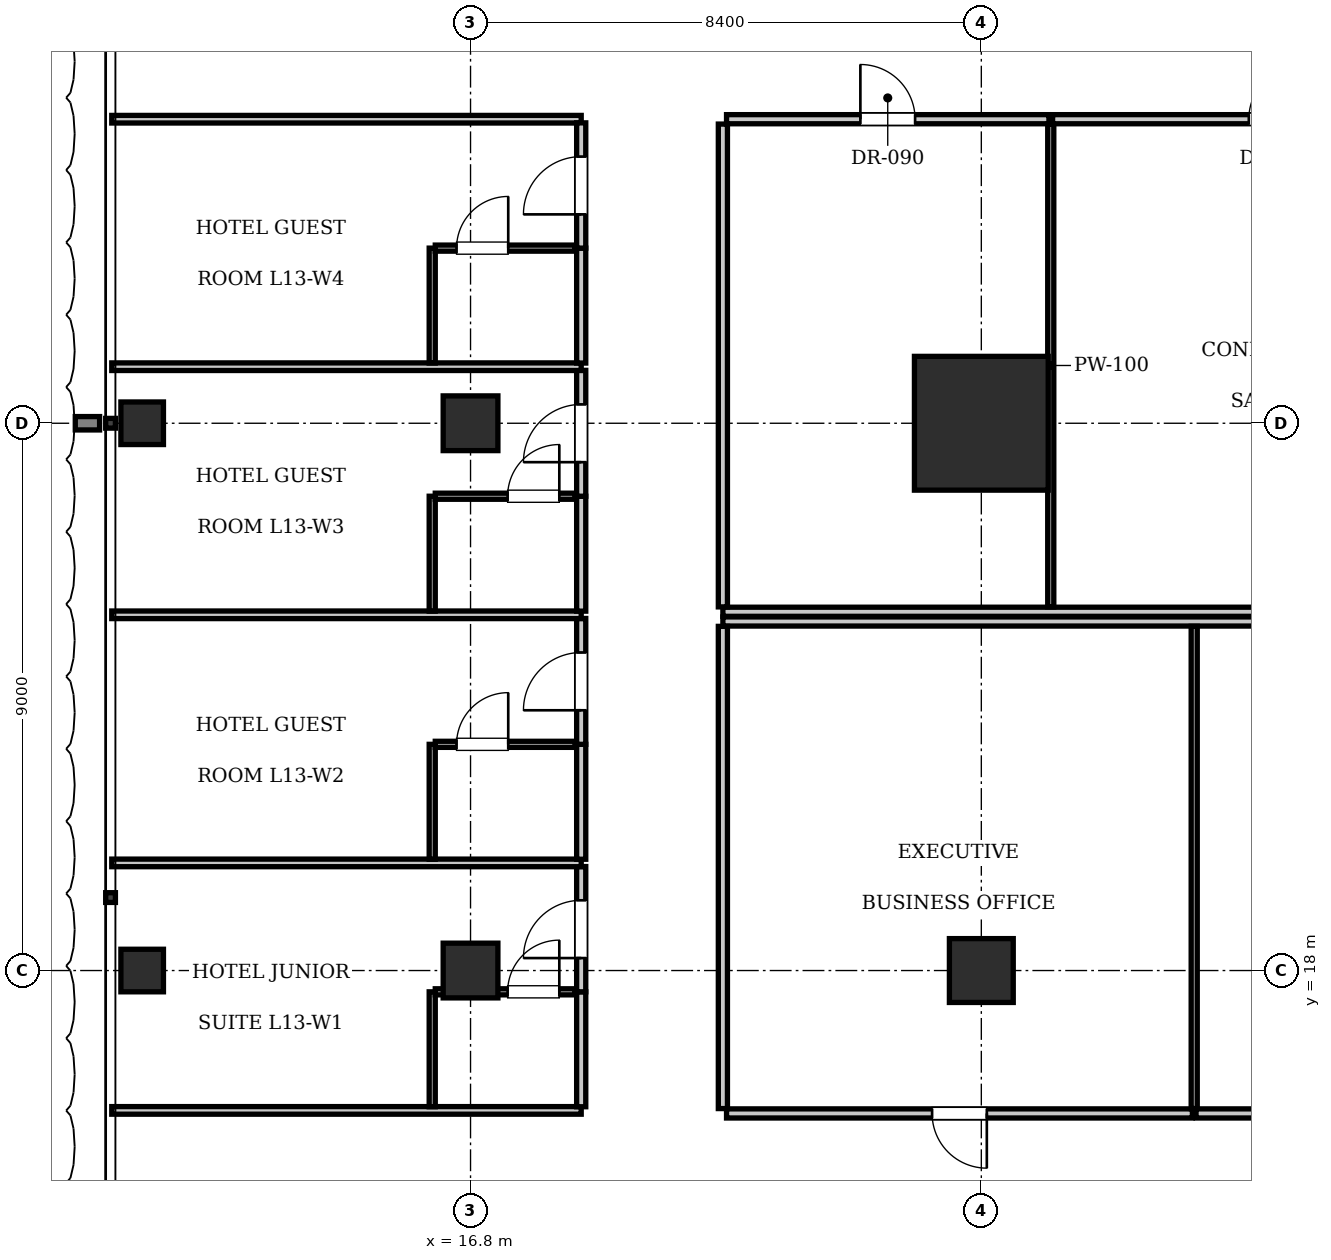
"""IFC4 building model, lengths in metres.
Left out: names, types, materials, properties, quantities, classifications, styles, units other than length and angle.
Written with IfcOpenShell. Run it as: python <this file> out.ifc"""

import sys

from ifc_helpers import new_model, si_unit, direction, frame, frame_2d, origin, origin_2d, place, context, subcontext, project, spatial, rectangle, i_section, extrude, element, fill, save


model = new_model("IFC4")
c1 = context("Model", 3, precision=1e-05, world=origin(), true_north=direction((0.0, 1.0)))
c2 = subcontext(c1, "Body", "Model", "MODEL_VIEW")
j1 = project(units=[si_unit("LENGTHUNIT", "METRE"), si_unit("PLANEANGLEUNIT", "RADIAN")], contexts=[c1])
p1 = place(None, origin())
s1 = spatial("IfcSite", under=j1, at=p1, CompositionType="ELEMENT")
p2 = place(p1, origin())
s2 = spatial("IfcBuilding", under=s1, at=p2, CompositionType="ELEMENT")
p3 = place(p2, frame((0.0, 0.0, 57.75)))
s3 = spatial("IfcBuildingStorey", under=s2, at=p3, CompositionType="ELEMENT", Elevation=57.75)
p4 = place(p3, frame((25.2, 27.0, 0.0), z_axis=(0.0, 0.0, 1.0), x_axis=(1.0, 0.0, 0.0)))
e1 = element("IfcColumn", 1, at=p4, inside=s3, PredefinedType="COLUMN", context=c2, shape_type="SweptSolid", body=[
    extrude(rectangle(XDim=2.2, YDim=2.2, at=origin_2d()), origin(), (0.0, 0.0, 1.0), 3.85),
])
p5 = place(p3, frame((25.2, 18.0, 0.0), z_axis=(0.0, 0.0, 1.0), x_axis=(1.0, 0.0, 0.0)))
e2 = element("IfcColumn", 2, at=p5, inside=s3, PredefinedType="COLUMN", context=c2, shape_type="SweptSolid", body=[
    extrude(rectangle(XDim=1.05, YDim=1.05, at=origin_2d()), origin(), (0.0, 0.0, 1.0), 3.85),
])
for number, where, z_axis, x_axis in (
    (3, (16.8, 18.0, 0.0), (0.0, 0.0, 1.0), (1.0, 0.0, 0.0)),
    (4, (16.8, 27.0, 0.0), (0.0, 0.0, 1.0), (1.0, 0.0, 0.0)),
):
    element("IfcColumn", number, at=place(p3, frame(where, z_axis=z_axis, x_axis=x_axis)), inside=s3, PredefinedType="COLUMN", context=c2, shape_type="SweptSolid", body=[
        extrude(rectangle(XDim=0.9, YDim=0.9, at=origin_2d()), origin(), (0.0, 0.0, 1.0), 3.85),
    ])
for number, where, z_axis, x_axis in (
    (5, (11.4, 18.0, 0.0), (0.0, 0.0, 1.0), (1.0, 0.0, 0.0)),
    (6, (11.4, 27.0, 0.0), (0.0, 0.0, 1.0), (1.0, 0.0, 0.0)),
):
    element("IfcColumn", number, at=place(p3, frame(where, z_axis=z_axis, x_axis=x_axis)), inside=s3, PredefinedType="COLUMN", context=c2, shape_type="SweptSolid", body=[
        extrude(i_section(OverallWidth=0.7, OverallDepth=0.7, WebThickness=0.028, FlangeThickness=0.044, at=origin_2d()), origin(), (0.0, 0.0, 1.0), 3.85),
    ])
p6 = place(p3, frame((20.95, 23.9, 0.0), z_axis=(0.0, 0.0, 1.0), x_axis=(1.0, 0.0, 0.0)))
e7 = element("IfcWall", 7, at=p6, inside=s3, PredefinedType="PARTITIONING", context=c2, shape_type="SweptSolid", body=[
    extrude(rectangle(XDim=33.7, YDim=0.15, at=frame_2d((16.85, 0.0))), origin(), (0.0, 0.0, 1.0), 3.61),
])
p7 = place(p3, frame((20.95, 23.98, 0.0), z_axis=(0.0, 0.0, 1.0), x_axis=(0.0, 1.0, 0.0)))
e8 = element("IfcWall", 8, at=p7, inside=s3, PredefinedType="PARTITIONING", context=c2, shape_type="SweptSolid", body=[
    extrude(rectangle(XDim=7.94, YDim=0.15, at=frame_2d((3.97, 0.0))), origin(), (0.0, 0.0, 1.0), 3.255),
])
p8 = place(p3, frame((21.01, 32.0, 0.0), z_axis=(0.0, 0.0, 1.0), x_axis=(1.0, 0.0, 0.0)))
e9 = element("IfcWall", 9, at=p8, inside=s3, PredefinedType="PARTITIONING", context=c2, shape_type="SweptSolid", body=[
    extrude(rectangle(XDim=5.302, YDim=0.15, at=frame_2d((2.651, 0.0))), origin(), (0.0, 0.0, 1.0), 3.61),
])
p9 = place(p8, frame((2.201, 0.0, 0.0)))
e10 = element("IfcOpeningElement", 10, at=p9, cuts=e9, PredefinedType="OPENING", context=c2, shape_type="SweptSolid", body=[
    extrude(rectangle(XDim=0.9, YDim=2.1, at=frame_2d((0.45, 1.05))), frame((0.0, 0.085, 0.0), z_axis=(0.0, -1.0, 0.0), x_axis=(1.0, 0.0, 0.0)), (0.0, 0.0, 1.0), 0.17),
])
p10 = place(p3, frame((26.342, 23.98, 0.0), z_axis=(0.0, 0.0, 1.0), x_axis=(0.0, 1.0, 0.0)))
e11 = element("IfcWall", 11, at=p10, inside=s3, PredefinedType="PARTITIONING", context=c2, shape_type="SweptSolid", body=[
    extrude(rectangle(XDim=7.94, YDim=0.1, at=frame_2d((3.97, 0.0))), origin(), (0.0, 0.0, 1.0), 3.61),
])
p11 = place(p3, frame((26.372, 32.0, 0.0), z_axis=(0.0, 0.0, 1.0), x_axis=(1.0, 0.0, 0.0)))
e12 = element("IfcWall", 12, at=p11, inside=s3, PredefinedType="PARTITIONING", context=c2, shape_type="SweptSolid", body=[
    extrude(rectangle(XDim=7.354, YDim=0.15, at=frame_2d((3.677, 0.0))), origin(), (0.0, 0.0, 1.0), 3.61),
])
p12 = place(p11, frame((3.227, 0.0, 0.0)))
e13 = element("IfcOpeningElement", 13, at=p12, cuts=e12, PredefinedType="OPENING", context=c2, shape_type="SweptSolid", body=[
    extrude(rectangle(XDim=0.9, YDim=2.1, at=frame_2d((0.45, 1.05))), frame((0.0, 0.085, 0.0), z_axis=(0.0, -1.0, 0.0), x_axis=(1.0, 0.0, 0.0)), (0.0, 0.0, 1.0), 0.17),
])
p13 = place(p3, frame((20.95, 23.74, 0.0), z_axis=(0.0, 0.0, 1.0), x_axis=(1.0, 0.0, 0.0)))
e14 = element("IfcWall", 14, at=p13, inside=s3, PredefinedType="PARTITIONING", context=c2, shape_type="SweptSolid", body=[
    extrude(rectangle(XDim=33.7, YDim=0.15, at=frame_2d((16.85, 0.0))), origin(), (0.0, 0.0, 1.0), 3.61),
])
p14 = place(p3, frame((20.95, 15.73, 0.0), z_axis=(0.0, 0.0, 1.0), x_axis=(0.0, 1.0, 0.0)))
e15 = element("IfcWall", 15, at=p14, inside=s3, PredefinedType="PARTITIONING", context=c2, shape_type="SweptSolid", body=[
    extrude(rectangle(XDim=7.93, YDim=0.15, at=frame_2d((3.965, 0.0))), origin(), (0.0, 0.0, 1.0), 3.207),
])
p15 = place(p3, frame((21.01, 15.65, 0.0), z_axis=(0.0, 0.0, 1.0), x_axis=(1.0, 0.0, 0.0)))
e16 = element("IfcWall", 16, at=p15, inside=s3, PredefinedType="PARTITIONING", context=c2, shape_type="SweptSolid", body=[
    extrude(rectangle(XDim=7.661, YDim=0.15, at=frame_2d((3.831, 0.0))), origin(), (0.0, 0.0, 1.0), 3.61),
])
p16 = place(p15, frame((3.381, 0.0, 0.0)))
e17 = element("IfcOpeningElement", 17, at=p16, cuts=e16, PredefinedType="OPENING", context=c2, shape_type="SweptSolid", body=[
    extrude(rectangle(XDim=0.9, YDim=2.1, at=frame_2d((0.45, 1.05))), frame((0.0, 0.085, 0.0), z_axis=(0.0, -1.0, 0.0), x_axis=(1.0, 0.0, 0.0)), (0.0, 0.0, 1.0), 0.17),
])
p17 = place(p3, frame((28.701, 15.73, 0.0), z_axis=(0.0, 0.0, 1.0), x_axis=(0.0, 1.0, 0.0)))
e18 = element("IfcWall", 18, at=p17, inside=s3, PredefinedType="PARTITIONING", context=c2, shape_type="SweptSolid", body=[
    extrude(rectangle(XDim=7.93, YDim=0.1, at=frame_2d((3.965, 0.0))), origin(), (0.0, 0.0, 1.0), 3.61),
])
p18 = place(p3, frame((28.731, 15.65, 0.0), z_axis=(0.0, 0.0, 1.0), x_axis=(1.0, 0.0, 0.0)))
e19 = element("IfcWall", 19, at=p18, inside=s3, PredefinedType="PARTITIONING", context=c2, shape_type="SweptSolid", body=[
    extrude(rectangle(XDim=11.398, YDim=0.15, at=frame_2d((5.699, 0.0))), origin(), (0.0, 0.0, 1.0), 3.61),
])
p19 = place(p18, frame((5.249, 0.0, 0.0)))
e20 = element("IfcOpeningElement", 20, at=p19, cuts=e19, PredefinedType="OPENING", context=c2, shape_type="SweptSolid", body=[
    extrude(rectangle(XDim=0.9, YDim=2.1, at=frame_2d((0.45, 1.05))), frame((0.0, 0.085, 0.0), z_axis=(0.0, -1.0, 0.0), x_axis=(1.0, 0.0, 0.0)), (0.0, 0.0, 1.0), 0.17),
])
for number, where, z_axis, x_axis in (
    (21, (10.9, 15.7, 0.0), (0.0, 0.0, 1.0), (1.0, 0.0, 0.0)),
    (22, (10.9, 32.0, 0.0), (0.0, 0.0, 1.0), (1.0, 0.0, 0.0)),
):
    element("IfcWall", number, at=place(p3, frame(where, z_axis=z_axis, x_axis=x_axis)), inside=s3, PredefinedType="PARTITIONING", context=c2, shape_type="SweptSolid", body=[
        extrude(rectangle(XDim=7.72, YDim=0.125, at=frame_2d((3.86, 0.0))), origin(), (0.0, 0.0, 1.0), 3.61),
    ])
p20 = place(p3, frame((18.62, 15.76, 0.0), z_axis=(0.0, 0.0, 1.0), x_axis=(0.0, 1.0, 0.0)))
e23 = element("IfcWall", 23, at=p20, inside=s3, PredefinedType="PARTITIONING", context=c2, shape_type="SweptSolid", body=[
    extrude(rectangle(XDim=1.89, YDim=0.15, at=frame_2d((0.945, 0.0))), origin(), (0.0, 0.0, 1.0), 3.61),
])
p21 = place(p3, frame((18.62, 17.65, 0.0), z_axis=(0.0, 0.0, 1.0), x_axis=(0.0, 1.0, 0.0)))
e24 = element("IfcWall", 24, at=p21, inside=s3, PredefinedType="PARTITIONING", context=c2, shape_type="SweptSolid", body=[
    extrude(rectangle(XDim=2.06, YDim=0.15, at=frame_2d((1.03, 0.0))), origin(), (0.0, 0.0, 1.0), 3.61),
])
p22 = place(p21, frame((0.555, 0.0, 0.0)))
e25 = element("IfcOpeningElement", 25, at=p22, cuts=e24, PredefinedType="OPENING", context=c2, shape_type="SweptSolid", body=[
    extrude(rectangle(XDim=0.95, YDim=2.15, at=frame_2d((0.475, 1.075))), frame((0.0, 0.085, 0.0), z_axis=(0.0, -1.0, 0.0), x_axis=(1.0, 0.0, 0.0)), (0.0, 0.0, 1.0), 0.17),
])
p23 = place(p3, frame((16.17, 15.76, 0.0), z_axis=(0.0, 0.0, 1.0), x_axis=(0.0, 1.0, 0.0)))
e26 = element("IfcWall", 26, at=p23, inside=s3, PredefinedType="PARTITIONING", context=c2, shape_type="SweptSolid", body=[
    extrude(rectangle(XDim=1.89, YDim=0.1, at=frame_2d((0.945, 0.0))), origin(), (0.0, 0.0, 1.0), 3.61),
])
p24 = place(p3, frame((16.22, 17.65, 0.0), z_axis=(0.0, 0.0, 1.0), x_axis=(1.0, 0.0, 0.0)))
e27 = element("IfcWall", 27, at=p24, inside=s3, PredefinedType="PARTITIONING", context=c2, shape_type="SweptSolid", body=[
    extrude(rectangle(XDim=2.3, YDim=0.1, at=frame_2d((1.15, 0.0))), origin(), (0.0, 0.0, 1.0), 3.61),
])
p25 = place(p24, frame((1.19, 0.0, 0.0)))
e28 = element("IfcOpeningElement", 28, at=p25, cuts=e27, PredefinedType="OPENING", context=c2, shape_type="SweptSolid", body=[
    extrude(rectangle(XDim=0.85, YDim=2.1, at=frame_2d((0.425, 1.05))), frame((0.0, 0.06, 0.0), z_axis=(0.0, -1.0, 0.0), x_axis=(1.0, 0.0, 0.0)), (0.0, 0.0, 1.0), 0.12),
])
p26 = place(p3, frame((10.9, 19.77, 0.0), z_axis=(0.0, 0.0, 1.0), x_axis=(1.0, 0.0, 0.0)))
e29 = element("IfcWall", 29, at=p26, inside=s3, PredefinedType="PARTITIONING", context=c2, shape_type="SweptSolid", body=[
    extrude(rectangle(XDim=7.72, YDim=0.125, at=frame_2d((3.86, 0.0))), origin(), (0.0, 0.0, 1.0), 3.61),
])
p27 = place(p3, frame((18.62, 19.83, 0.0), z_axis=(0.0, 0.0, 1.0), x_axis=(0.0, 1.0, 0.0)))
e30 = element("IfcWall", 30, at=p27, inside=s3, PredefinedType="PARTITIONING", context=c2, shape_type="SweptSolid", body=[
    extrude(rectangle(XDim=1.89, YDim=0.15, at=frame_2d((0.945, 0.0))), origin(), (0.0, 0.0, 1.0), 3.61),
])
p28 = place(p3, frame((18.62, 21.72, 0.0), z_axis=(0.0, 0.0, 1.0), x_axis=(0.0, 1.0, 0.0)))
e31 = element("IfcWall", 31, at=p28, inside=s3, PredefinedType="PARTITIONING", context=c2, shape_type="SweptSolid", body=[
    extrude(rectangle(XDim=2.07, YDim=0.15, at=frame_2d((1.035, 0.0))), origin(), (0.0, 0.0, 1.0), 3.61),
])
p29 = place(p28, frame((0.56, 0.0, 0.0)))
e32 = element("IfcOpeningElement", 32, at=p29, cuts=e31, PredefinedType="OPENING", context=c2, shape_type="SweptSolid", body=[
    extrude(rectangle(XDim=0.95, YDim=2.15, at=frame_2d((0.475, 1.075))), frame((0.0, 0.085, 0.0), z_axis=(0.0, -1.0, 0.0), x_axis=(1.0, 0.0, 0.0)), (0.0, 0.0, 1.0), 0.17),
])
p30 = place(p3, frame((16.17, 19.83, 0.0), z_axis=(0.0, 0.0, 1.0), x_axis=(0.0, 1.0, 0.0)))
e33 = element("IfcWall", 33, at=p30, inside=s3, PredefinedType="PARTITIONING", context=c2, shape_type="SweptSolid", body=[
    extrude(rectangle(XDim=1.89, YDim=0.1, at=frame_2d((0.945, 0.0))), origin(), (0.0, 0.0, 1.0), 3.61),
])
p31 = place(p3, frame((16.22, 21.72, 0.0), z_axis=(0.0, 0.0, 1.0), x_axis=(1.0, 0.0, 0.0)))
e34 = element("IfcWall", 34, at=p31, inside=s3, PredefinedType="PARTITIONING", context=c2, shape_type="SweptSolid", body=[
    extrude(rectangle(XDim=2.3, YDim=0.1, at=frame_2d((1.15, 0.0))), origin(), (0.0, 0.0, 1.0), 3.61),
])
p32 = place(p31, frame((0.35, 0.0, 0.0)))
e35 = element("IfcOpeningElement", 35, at=p32, cuts=e34, PredefinedType="OPENING", context=c2, shape_type="SweptSolid", body=[
    extrude(rectangle(XDim=0.85, YDim=2.1, at=frame_2d((0.425, 1.05))), frame((0.0, 0.06, 0.0), z_axis=(0.0, -1.0, 0.0), x_axis=(1.0, 0.0, 0.0)), (0.0, 0.0, 1.0), 0.12),
])
p33 = place(p3, frame((10.9, 23.85, 0.0), z_axis=(0.0, 0.0, 1.0), x_axis=(1.0, 0.0, 0.0)))
e36 = element("IfcWall", 36, at=p33, inside=s3, PredefinedType="PARTITIONING", context=c2, shape_type="SweptSolid", body=[
    extrude(rectangle(XDim=7.72, YDim=0.125, at=frame_2d((3.86, 0.0))), origin(), (0.0, 0.0, 1.0), 3.61),
])
p34 = place(p3, frame((18.62, 23.91, 0.0), z_axis=(0.0, 0.0, 1.0), x_axis=(0.0, 1.0, 0.0)))
e37 = element("IfcWall", 37, at=p34, inside=s3, PredefinedType="PARTITIONING", context=c2, shape_type="SweptSolid", body=[
    extrude(rectangle(XDim=1.89, YDim=0.15, at=frame_2d((0.945, 0.0))), origin(), (0.0, 0.0, 1.0), 3.61),
])
p35 = place(p3, frame((18.62, 25.8, 0.0), z_axis=(0.0, 0.0, 1.0), x_axis=(0.0, 1.0, 0.0)))
e38 = element("IfcWall", 38, at=p35, inside=s3, PredefinedType="PARTITIONING", context=c2, shape_type="SweptSolid", body=[
    extrude(rectangle(XDim=2.07, YDim=0.15, at=frame_2d((1.035, 0.0))), origin(), (0.0, 0.0, 1.0), 3.61),
])
p36 = place(p35, frame((0.56, 0.0, 0.0)))
e39 = element("IfcOpeningElement", 39, at=p36, cuts=e38, PredefinedType="OPENING", context=c2, shape_type="SweptSolid", body=[
    extrude(rectangle(XDim=0.95, YDim=2.15, at=frame_2d((0.475, 1.075))), frame((0.0, 0.085, 0.0), z_axis=(0.0, -1.0, 0.0), x_axis=(1.0, 0.0, 0.0)), (0.0, 0.0, 1.0), 0.17),
])
p37 = place(p3, frame((16.17, 23.91, 0.0), z_axis=(0.0, 0.0, 1.0), x_axis=(0.0, 1.0, 0.0)))
e40 = element("IfcWall", 40, at=p37, inside=s3, PredefinedType="PARTITIONING", context=c2, shape_type="SweptSolid", body=[
    extrude(rectangle(XDim=1.89, YDim=0.1, at=frame_2d((0.945, 0.0))), origin(), (0.0, 0.0, 1.0), 3.61),
])
p38 = place(p3, frame((16.22, 25.8, 0.0), z_axis=(0.0, 0.0, 1.0), x_axis=(1.0, 0.0, 0.0)))
e41 = element("IfcWall", 41, at=p38, inside=s3, PredefinedType="PARTITIONING", context=c2, shape_type="SweptSolid", body=[
    extrude(rectangle(XDim=2.3, YDim=0.1, at=frame_2d((1.15, 0.0))), origin(), (0.0, 0.0, 1.0), 3.61),
])
p39 = place(p38, frame((1.19, 0.0, 0.0)))
e42 = element("IfcOpeningElement", 42, at=p39, cuts=e41, PredefinedType="OPENING", context=c2, shape_type="SweptSolid", body=[
    extrude(rectangle(XDim=0.85, YDim=2.1, at=frame_2d((0.425, 1.05))), frame((0.0, 0.06, 0.0), z_axis=(0.0, -1.0, 0.0), x_axis=(1.0, 0.0, 0.0)), (0.0, 0.0, 1.0), 0.12),
])
p40 = place(p3, frame((10.9, 27.93, 0.0), z_axis=(0.0, 0.0, 1.0), x_axis=(1.0, 0.0, 0.0)))
e43 = element("IfcWall", 43, at=p40, inside=s3, PredefinedType="PARTITIONING", context=c2, shape_type="SweptSolid", body=[
    extrude(rectangle(XDim=7.72, YDim=0.125, at=frame_2d((3.86, 0.0))), origin(), (0.0, 0.0, 1.0), 3.61),
])
p41 = place(p3, frame((18.62, 27.99, 0.0), z_axis=(0.0, 0.0, 1.0), x_axis=(0.0, 1.0, 0.0)))
e44 = element("IfcWall", 44, at=p41, inside=s3, PredefinedType="PARTITIONING", context=c2, shape_type="SweptSolid", body=[
    extrude(rectangle(XDim=1.89, YDim=0.15, at=frame_2d((0.945, 0.0))), origin(), (0.0, 0.0, 1.0), 3.61),
])
p42 = place(p3, frame((18.62, 29.88, 0.0), z_axis=(0.0, 0.0, 1.0), x_axis=(0.0, 1.0, 0.0)))
e45 = element("IfcWall", 45, at=p42, inside=s3, PredefinedType="PARTITIONING", context=c2, shape_type="SweptSolid", body=[
    extrude(rectangle(XDim=2.06, YDim=0.15, at=frame_2d((1.03, 0.0))), origin(), (0.0, 0.0, 1.0), 3.61),
])
p43 = place(p42, frame((0.555, 0.0, 0.0)))
e46 = element("IfcOpeningElement", 46, at=p43, cuts=e45, PredefinedType="OPENING", context=c2, shape_type="SweptSolid", body=[
    extrude(rectangle(XDim=0.95, YDim=2.15, at=frame_2d((0.475, 1.075))), frame((0.0, 0.085, 0.0), z_axis=(0.0, -1.0, 0.0), x_axis=(1.0, 0.0, 0.0)), (0.0, 0.0, 1.0), 0.17),
])
p44 = place(p3, frame((16.17, 27.99, 0.0), z_axis=(0.0, 0.0, 1.0), x_axis=(0.0, 1.0, 0.0)))
e47 = element("IfcWall", 47, at=p44, inside=s3, PredefinedType="PARTITIONING", context=c2, shape_type="SweptSolid", body=[
    extrude(rectangle(XDim=1.89, YDim=0.1, at=frame_2d((0.945, 0.0))), origin(), (0.0, 0.0, 1.0), 3.61),
])
p45 = place(p3, frame((16.22, 29.88, 0.0), z_axis=(0.0, 0.0, 1.0), x_axis=(1.0, 0.0, 0.0)))
e48 = element("IfcWall", 48, at=p45, inside=s3, PredefinedType="PARTITIONING", context=c2, shape_type="SweptSolid", body=[
    extrude(rectangle(XDim=2.3, YDim=0.1, at=frame_2d((1.15, 0.0))), origin(), (0.0, 0.0, 1.0), 3.61),
])
p46 = place(p45, frame((0.35, 0.0, 0.0)))
e49 = element("IfcOpeningElement", 49, at=p46, cuts=e48, PredefinedType="OPENING", context=c2, shape_type="SweptSolid", body=[
    extrude(rectangle(XDim=0.85, YDim=2.1, at=frame_2d((0.425, 1.05))), frame((0.0, 0.06, 0.0), z_axis=(0.0, -1.0, 0.0), x_axis=(1.0, 0.0, 0.0)), (0.0, 0.0, 1.0), 0.12),
])
p47 = place(p9, origin())
e50 = element("IfcDoor", 50, at=p47, inside=s3, OperationType="SINGLE_SWING_LEFT", PredefinedType="DOOR", context=c2, shape_type="SweptSolid", body=[
    extrude(rectangle(XDim=0.9, YDim=2.1, at=frame_2d((0.45, 1.05))), frame((0.0, 0.025, 0.0), z_axis=(0.0, -1.0, 0.0), x_axis=(1.0, 0.0, 0.0)), (0.0, 0.0, 1.0), 0.05),
])
fill(e10, e50)
p48 = place(p12, origin())
e51 = element("IfcDoor", 51, at=p48, inside=s3, OperationType="SINGLE_SWING_RIGHT", PredefinedType="DOOR", context=c2, shape_type="SweptSolid", body=[
    extrude(rectangle(XDim=0.9, YDim=2.1, at=frame_2d((0.45, 1.05))), frame((0.0, 0.025, 0.0), z_axis=(0.0, -1.0, 0.0), x_axis=(1.0, 0.0, 0.0)), (0.0, 0.0, 1.0), 0.05),
])
fill(e13, e51)
p49 = place(p16, frame((0.9, 0.0, 0.0), z_axis=(0.0, 0.0, 1.0), x_axis=(-1.0, 0.0, 0.0)))
e52 = element("IfcDoor", 52, at=p49, inside=s3, OperationType="SINGLE_SWING_LEFT", PredefinedType="DOOR", context=c2, shape_type="SweptSolid", body=[
    extrude(rectangle(XDim=0.9, YDim=2.1, at=frame_2d((0.45, 1.05))), frame((0.0, 0.025, 0.0), z_axis=(0.0, -1.0, 0.0), x_axis=(1.0, 0.0, 0.0)), (0.0, 0.0, 1.0), 0.05),
])
fill(e17, e52)
p50 = place(p25, origin())
e53 = element("IfcDoor", 53, at=p50, inside=s3, OperationType="SINGLE_SWING_RIGHT", PredefinedType="DOOR", context=c2, shape_type="SweptSolid", body=[
    extrude(rectangle(XDim=0.85, YDim=2.1, at=frame_2d((0.425, 1.05))), frame((0.0, 0.025, 0.0), z_axis=(0.0, -1.0, 0.0), x_axis=(1.0, 0.0, 0.0)), (0.0, 0.0, 1.0), 0.05),
])
fill(e28, e53)
p51 = place(p22, origin())
e54 = element("IfcDoor", 54, at=p51, inside=s3, OperationType="SINGLE_SWING_LEFT", PredefinedType="DOOR", context=c2, shape_type="SweptSolid", body=[
    extrude(rectangle(XDim=0.95, YDim=2.15, at=frame_2d((0.475, 1.075))), frame((0.0, 0.025, 0.0), z_axis=(0.0, -1.0, 0.0), x_axis=(1.0, 0.0, 0.0)), (0.0, 0.0, 1.0), 0.05),
])
fill(e25, e54)
p52 = place(p32, origin())
e55 = element("IfcDoor", 55, at=p52, inside=s3, OperationType="SINGLE_SWING_RIGHT", PredefinedType="DOOR", context=c2, shape_type="SweptSolid", body=[
    extrude(rectangle(XDim=0.85, YDim=2.1, at=frame_2d((0.425, 1.05))), frame((0.0, 0.025, 0.0), z_axis=(0.0, -1.0, 0.0), x_axis=(1.0, 0.0, 0.0)), (0.0, 0.0, 1.0), 0.05),
])
fill(e35, e55)
p53 = place(p29, origin())
e56 = element("IfcDoor", 56, at=p53, inside=s3, OperationType="SINGLE_SWING_LEFT", PredefinedType="DOOR", context=c2, shape_type="SweptSolid", body=[
    extrude(rectangle(XDim=0.95, YDim=2.15, at=frame_2d((0.475, 1.075))), frame((0.0, 0.025, 0.0), z_axis=(0.0, -1.0, 0.0), x_axis=(1.0, 0.0, 0.0)), (0.0, 0.0, 1.0), 0.05),
])
fill(e32, e56)
p54 = place(p39, origin())
e57 = element("IfcDoor", 57, at=p54, inside=s3, OperationType="SINGLE_SWING_RIGHT", PredefinedType="DOOR", context=c2, shape_type="SweptSolid", body=[
    extrude(rectangle(XDim=0.85, YDim=2.1, at=frame_2d((0.425, 1.05))), frame((0.0, 0.025, 0.0), z_axis=(0.0, -1.0, 0.0), x_axis=(1.0, 0.0, 0.0)), (0.0, 0.0, 1.0), 0.05),
])
fill(e42, e57)
p55 = place(p36, origin())
e58 = element("IfcDoor", 58, at=p55, inside=s3, OperationType="SINGLE_SWING_LEFT", PredefinedType="DOOR", context=c2, shape_type="SweptSolid", body=[
    extrude(rectangle(XDim=0.95, YDim=2.15, at=frame_2d((0.475, 1.075))), frame((0.0, 0.025, 0.0), z_axis=(0.0, -1.0, 0.0), x_axis=(1.0, 0.0, 0.0)), (0.0, 0.0, 1.0), 0.05),
])
fill(e39, e58)
p56 = place(p46, origin())
e59 = element("IfcDoor", 59, at=p56, inside=s3, OperationType="SINGLE_SWING_RIGHT", PredefinedType="DOOR", context=c2, shape_type="SweptSolid", body=[
    extrude(rectangle(XDim=0.85, YDim=2.1, at=frame_2d((0.425, 1.05))), frame((0.0, 0.025, 0.0), z_axis=(0.0, -1.0, 0.0), x_axis=(1.0, 0.0, 0.0)), (0.0, 0.0, 1.0), 0.05),
])
fill(e49, e59)
p57 = place(p43, origin())
e60 = element("IfcDoor", 60, at=p57, inside=s3, OperationType="SINGLE_SWING_LEFT", PredefinedType="DOOR", context=c2, shape_type="SweptSolid", body=[
    extrude(rectangle(XDim=0.95, YDim=2.15, at=frame_2d((0.475, 1.075))), frame((0.0, 0.025, 0.0), z_axis=(0.0, -1.0, 0.0), x_axis=(1.0, 0.0, 0.0)), (0.0, 0.0, 1.0), 0.05),
])
fill(e46, e60)
save(model, sys.argv[1])
